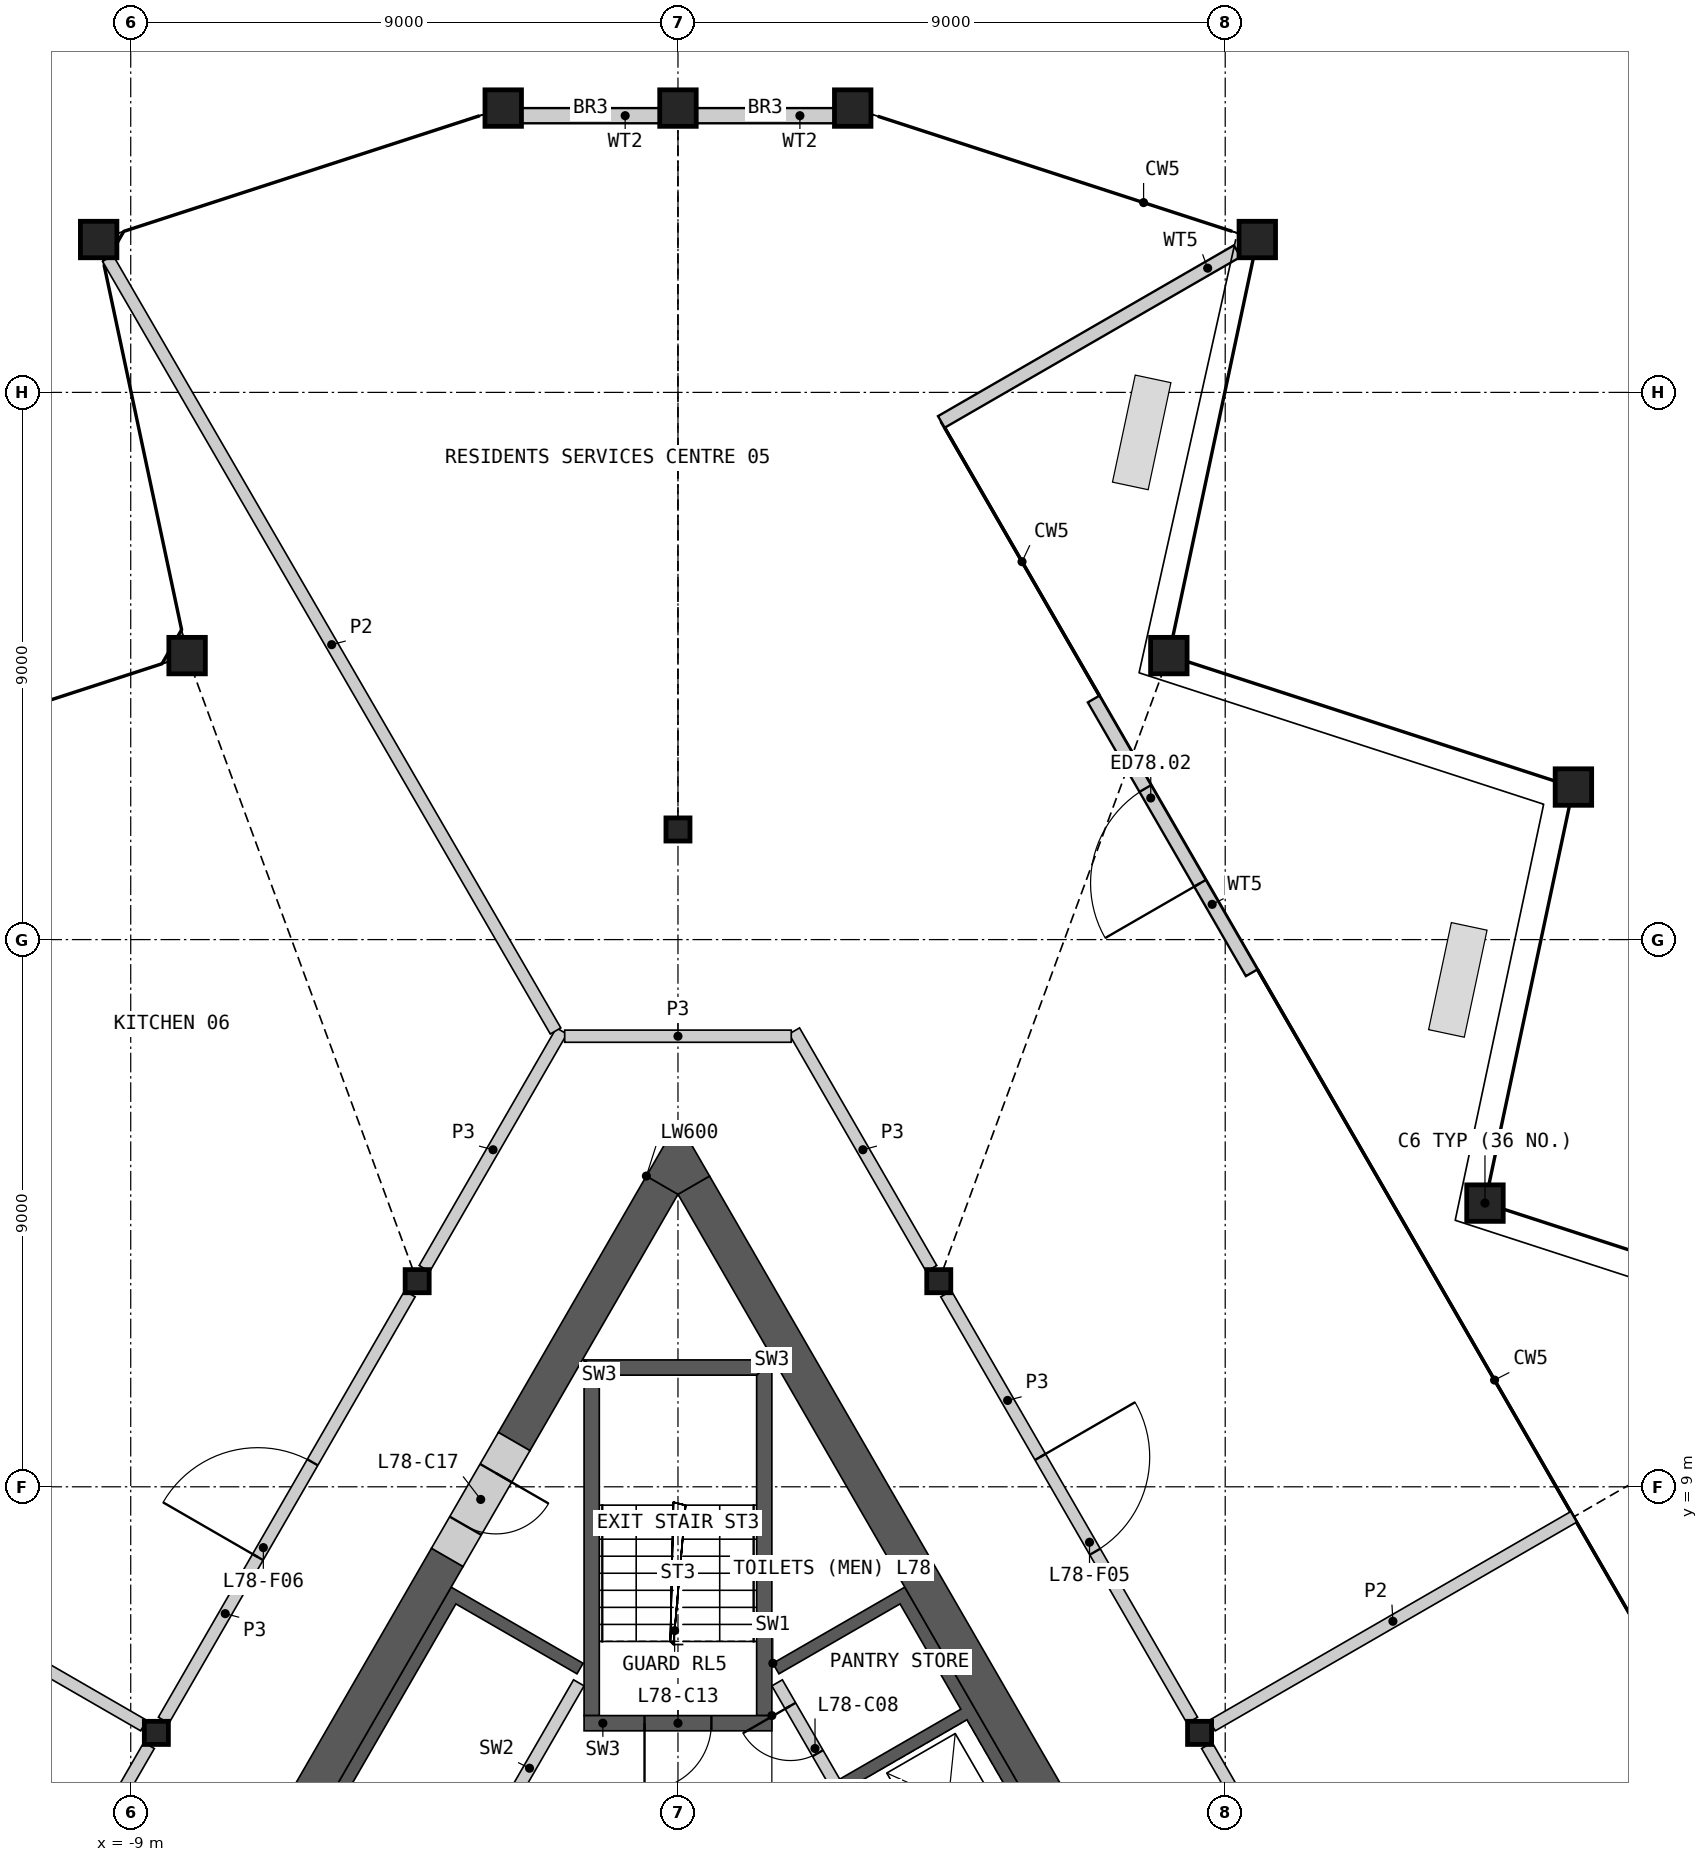
"""IFC4 building model, lengths in metres.
Left out: names, types, materials, properties, quantities, classifications, styles, units other than length and angle.
Written with IfcOpenShell. Run it as: python <this file> out.ifc"""

import sys

from ifc_helpers import new_model, si_unit, direction, frame, frame_2d, origin, origin_2d, place, context, subcontext, project, spatial, polyline, rectangle, hollow_rectangle, i_section, outline, extrude, element, fill, save


model = new_model("IFC4")
c1 = context("Model", 3, precision=1e-05, world=origin(), true_north=direction((0.0, 1.0)))
c2 = subcontext(c1, "Body", "Model", "MODEL_VIEW")
j1 = project(units=[si_unit("LENGTHUNIT", "METRE"), si_unit("PLANEANGLEUNIT", "RADIAN")], contexts=[c1])
p1 = place(None, origin())
s1 = spatial("IfcSite", under=j1, at=p1, CompositionType="ELEMENT")
p2 = place(p1, origin())
s2 = spatial("IfcBuilding", under=s1, at=p2, CompositionType="ELEMENT")
p3 = place(p2, frame((0.0, 0.0, 346.0)))
s3 = spatial("IfcBuildingStorey", under=s2, at=p3, CompositionType="ELEMENT", Elevation=346.0)
for number, where, z_axis, x_axis in (
    (1, (13.272, 13.666, 0.0), (0.0, 0.0, 1.0), (1.0, 0.0, 0.0)),
    (2, (14.727, 20.509, 0.0), (0.0, 0.0, 1.0), (1.0, 0.0, 0.0)),
    (3, (8.073, 22.671, 0.0), (0.0, 0.0, 1.0), (1.0, 0.0, 0.0)),
    (4, (9.527, 29.514, 0.0), (0.0, 0.0, 1.0), (1.0, 0.0, 0.0)),
    (5, (2.874, 31.676, 0.0), (0.0, 0.0, 1.0), (1.0, 0.0, 0.0)),
    (6, (0.0, 31.676, 0.0), (0.0, 0.0, 1.0), (1.0, 0.0, 0.0)),
    (7, (-2.874, 31.676, 0.0), (0.0, 0.0, 1.0), (1.0, 0.0, 0.0)),
    (8, (-9.527, 29.514, 0.0), (0.0, 0.0, 1.0), (1.0, 0.0, 0.0)),
    (9, (-8.073, 22.671, 0.0), (0.0, 0.0, 1.0), (1.0, 0.0, 0.0)),
):
    element("IfcColumn", number, at=place(p3, frame(where, z_axis=z_axis, x_axis=x_axis)), inside=s3, PredefinedType="COLUMN", context=c2, shape_type="SweptSolid", body=[
        extrude(hollow_rectangle(XDim=0.6, YDim=0.6, WallThickness=0.04, at=origin_2d()), origin(), (0.0, 0.0, 1.0), 10.0),
    ])
for number, where, z_axis, x_axis in (
    (10, (0.0, 19.811, 0.0), (0.0, 0.0, 1.0), (1.0, 0.0, 0.0)),
    (11, (-4.289, 12.382, 0.0), (0.0, 0.0, 1.0), (1.0, 0.0, 0.0)),
    (12, (-8.578, 4.953, 0.0), (0.0, 0.0, 1.0), (1.0, 0.0, 0.0)),
    (13, (8.578, 4.953, 0.0), (0.0, 0.0, 1.0), (1.0, 0.0, 0.0)),
    (14, (4.289, 12.382, 0.0), (0.0, 0.0, 1.0), (1.0, 0.0, 0.0)),
):
    element("IfcColumn", number, at=place(p3, frame(where, z_axis=z_axis, x_axis=x_axis)), inside=s3, PredefinedType="COLUMN", context=c2, shape_type="SweptSolid", body=[
        extrude(i_section(OverallWidth=0.396, OverallDepth=0.381, WebThickness=0.019, FlangeThickness=0.03, at=origin_2d()), origin(), (0.0, 0.0, 1.0), 10.0),
    ])
for number, where, z_axis, x_axis in (
    (15, (2.574, 31.551, 0.0), (0.0, 0.0, 1.0), (-1.0, 0.0, 0.0)),
    (16, (-0.3, 31.551, 0.0), (0.0, 0.0, 1.0), (-1.0, 0.0, 0.0)),
):
    element("IfcWall", number, at=place(p3, frame(where, z_axis=z_axis, x_axis=x_axis)), inside=s3, PredefinedType="SOLIDWALL", context=c2, shape_type="SweptSolid", body=[
        extrude(rectangle(XDim=2.274, YDim=0.25, at=frame_2d((1.137, 0.0))), origin(), (0.0, 0.0, 1.0), 9.088),
    ])
p4 = place(p3, frame((9.435, 17.454, 0.0), z_axis=(0.0, 0.0, 1.0), x_axis=(-0.500017832597, 0.866015107885, 0.0)))
e17 = element("IfcWall", 17, at=p4, inside=s3, PredefinedType="SOLIDWALL", context=c2, shape_type="SweptSolid", body=[
    extrude(rectangle(XDim=5.199, YDim=0.22, at=frame_2d((2.6, 0.0))), origin(), (0.0, 0.0, 1.0), 9.088),
])
p5 = place(p4, frame((1.699, 0.0, 0.0)))
e18 = element("IfcOpeningElement", 18, at=p5, cuts=e17, PredefinedType="OPENING", context=c2, shape_type="SweptSolid", body=[
    extrude(rectangle(XDim=1.8, YDim=2.4, at=frame_2d((0.9, 1.2))), frame((0.0, 0.12, 0.0), z_axis=(0.0, -1.0, 0.0), x_axis=(1.0, 0.0, 0.0)), (0.0, 0.0, 1.0), 0.24),
])
p6 = place(p3, frame((9.198, 29.324, 0.0), z_axis=(0.0, 0.0, 1.0), x_axis=(-0.866015577098, -0.500017019934, 0.0)))
e19 = element("IfcWall", 19, at=p6, inside=s3, PredefinedType="SOLIDWALL", context=c2, shape_type="SweptSolid", body=[
    extrude(rectangle(XDim=5.62, YDim=0.22, at=frame_2d((2.81, 0.0))), origin(), (0.0, 0.0, 1.0), 9.088),
])
p7 = place(p3, origin())
e20 = element("IfcWall", 20, at=p7, inside=s3, PredefinedType="SHEAR", context=c2, shape_type="SweptSolid", body=[
    extrude(outline(polyline([(1.561, 6.097), (3.731, 7.35), (8.231, -0.444), (6.061, -1.697), (5.96, -1.524), (7.952, -0.374), (6.952, 1.358), (4.96, 0.208), (4.861, 0.381), (6.852, 1.531), (5.852, 3.263), (3.861, 2.113), (3.76, 2.287), (5.752, 3.437), (4.752, 5.169), (2.76, 4.019), (2.66, 4.192), (4.652, 5.342), (3.652, 7.074), (1.66, 5.924), (1.561, 6.097)])), origin(), (0.0, 0.0, 1.0), 9.7),
])
p8 = place(p3, frame((5.817, -1.476, 0.0), z_axis=(0.0, 0.0, 1.0), x_axis=(-0.500002616675, 0.866023893041, 0.0)))
e21 = element("IfcWall", 21, at=p8, inside=s3, PredefinedType="SOLIDWALL", context=c2, shape_type="SweptSolid", body=[
    extrude(rectangle(XDim=8.373, YDim=0.2, at=frame_2d((4.187, 0.0))), origin(), (0.0, 0.0, 1.0), 9.7),
])
p9 = place(p8, frame((0.337, 0.0, 0.0)))
e22 = element("IfcOpeningElement", 22, at=p9, cuts=e21, PredefinedType="OPENING", context=c2, shape_type="SweptSolid", body=[
    extrude(rectangle(XDim=1.1, YDim=2.1, at=frame_2d((0.55, 1.05))), frame((0.0, 0.11, 0.0), z_axis=(0.0, -1.0, 0.0), x_axis=(1.0, 0.0, 0.0)), (0.0, 0.0, 1.0), 0.22),
])
p10 = place(p8, frame((2.537, 0.0, 0.0)))
e23 = element("IfcOpeningElement", 23, at=p10, cuts=e21, PredefinedType="OPENING", context=c2, shape_type="SweptSolid", body=[
    extrude(rectangle(XDim=1.1, YDim=2.1, at=frame_2d((0.55, 1.05))), frame((0.0, 0.11, 0.0), z_axis=(0.0, -1.0, 0.0), x_axis=(1.0, 0.0, 0.0)), (0.0, 0.0, 1.0), 0.22),
])
p11 = place(p8, frame((4.737, 0.0, 0.0)))
e24 = element("IfcOpeningElement", 24, at=p11, cuts=e21, PredefinedType="OPENING", context=c2, shape_type="SweptSolid", body=[
    extrude(rectangle(XDim=1.1, YDim=2.1, at=frame_2d((0.55, 1.05))), frame((0.0, 0.11, 0.0), z_axis=(0.0, -1.0, 0.0), x_axis=(1.0, 0.0, 0.0)), (0.0, 0.0, 1.0), 0.22),
])
p12 = place(p8, frame((7.037, 0.0, 0.0)))
e25 = element("IfcOpeningElement", 25, at=p12, cuts=e21, PredefinedType="OPENING", context=c2, shape_type="SweptSolid", body=[
    extrude(rectangle(XDim=0.9, YDim=2.1, at=frame_2d((0.45, 1.05))), frame((0.0, 0.11, 0.0), z_axis=(0.0, -1.0, 0.0), x_axis=(1.0, 0.0, 0.0)), (0.0, 0.0, 1.0), 0.22),
])
p13 = place(p3, origin())
e26 = element("IfcWall", 26, at=p13, inside=s3, PredefinedType="SHEAR", context=c2, shape_type="SweptSolid", body=[
    extrude(outline(polyline([(-4.96, 0.208), (-7.131, 1.461), (-3.731, 7.35), (-1.561, 6.097), (-1.66, 5.924), (-3.652, 7.074), (-6.852, 1.531), (-4.861, 0.381), (-4.96, 0.208)])), origin(), (0.0, 0.0, 1.0), 9.7),
])
p14 = place(p3, frame((-1.631, 5.776, 0.0), z_axis=(0.0, 0.0, 1.0), x_axis=(-0.499992876559, -0.866029516466, 0.0)))
e27 = element("IfcWall", 27, at=p14, inside=s3, PredefinedType="SOLIDWALL", context=c2, shape_type="SweptSolid", body=[
    extrude(rectangle(XDim=6.486, YDim=0.2, at=frame_2d((3.243, 0.0))), origin(), (0.0, 0.0, 1.0), 9.7),
])
p15 = place(p14, frame((2.637, 0.0, 0.0)))
e28 = element("IfcOpeningElement", 28, at=p15, cuts=e27, PredefinedType="OPENING", context=c2, shape_type="SweptSolid", body=[
    extrude(rectangle(XDim=0.9, YDim=2.1, at=frame_2d((0.45, 1.05))), frame((0.0, 0.11, 0.0), z_axis=(0.0, -1.0, 0.0), x_axis=(1.0, 0.0, 0.0)), (0.0, 0.0, 1.0), 0.22),
])
p16 = place(p3, origin())
e29 = element("IfcWall", 29, at=p16, inside=s3, PredefinedType="SHEAR", context=c2, shape_type="SweptSolid", body=[
    extrude(outline(polyline([(1.544, 5.237), (1.544, 11.087), (1.294, 10.837), (1.294, 5.237), (1.544, 5.237)])), origin(), (0.0, 0.0, 1.0), 9.7),
])
p17 = place(p3, origin())
e30 = element("IfcWall", 30, at=p17, inside=s3, PredefinedType="SHEAR", context=c2, shape_type="SweptSolid", body=[
    extrude(outline(polyline([(1.544, 11.087), (-1.544, 11.087), (-1.294, 10.837), (1.294, 10.837), (1.544, 11.087)])), origin(), (0.0, 0.0, 1.0), 9.7),
])
p18 = place(p3, origin())
e31 = element("IfcWall", 31, at=p18, inside=s3, PredefinedType="SHEAR", context=c2, shape_type="SweptSolid", body=[
    extrude(outline(polyline([(-1.294, 10.837), (-1.544, 11.087), (-1.544, 5.237), (-1.294, 5.237), (-1.294, 10.837)])), origin(), (0.0, 0.0, 1.0), 9.7),
])
p19 = place(p3, frame((1.544, 5.112, 0.0), z_axis=(0.0, 0.0, 1.0), x_axis=(-1.0, 0.0, 0.0)))
e32 = element("IfcWall", 32, at=p19, inside=s3, PredefinedType="SHEAR", context=c2, shape_type="SweptSolid", body=[
    extrude(rectangle(XDim=3.088, YDim=0.25, at=frame_2d((1.544, 0.0))), origin(), (0.0, 0.0, 1.0), 9.7),
])
p20 = place(p19, frame((0.994, 0.0, 0.0)))
e33 = element("IfcOpeningElement", 33, at=p20, cuts=e32, PredefinedType="OPENING", context=c2, shape_type="SweptSolid", body=[
    extrude(rectangle(XDim=1.1, YDim=2.1, at=frame_2d((0.55, 1.05))), frame((0.0, 0.135, 0.0), z_axis=(0.0, -1.0, 0.0), x_axis=(1.0, 0.0, 0.0)), (0.0, 0.0, 1.0), 0.27),
])
p21 = place(p3, frame((8.686, -0.634, 0.0), z_axis=(0.0, 0.0, 1.0), x_axis=(-0.500004601921, 0.866022746848, 0.0)))
e34 = element("IfcWall", 34, at=p21, inside=s3, PredefinedType="SHEAR", context=c2, shape_type="SweptSolid", body=[
    extrude(rectangle(XDim=16.853, YDim=0.6, at=frame_2d((8.426, 0.0))), origin(), (0.0, 0.0, 1.0), 9.7),
])
p22 = place(p3, frame((-3.794, 7.84, 0.0), z_axis=(0.0, 0.0, 1.0), x_axis=(-0.499974747889, -0.866039982607, 0.0)))
e35 = element("IfcWall", 35, at=p22, inside=s3, PredefinedType="SHEAR", context=c2, shape_type="SweptSolid", body=[
    extrude(rectangle(XDim=7.092, YDim=0.6, at=frame_2d((3.546, 0.0))), origin(), (0.0, 0.0, 1.0), 9.7),
])
p23 = place(p3, frame((-0.26, 13.961, 0.0), z_axis=(0.0, 0.0, 1.0), x_axis=(-0.50000604952, -0.866021911064, 0.0)))
e36 = element("IfcWall", 36, at=p23, inside=s3, PredefinedType="SHEAR", context=c2, shape_type="SweptSolid", body=[
    extrude(rectangle(XDim=4.869, YDim=0.6, at=frame_2d((2.434, 0.0))), origin(), (0.0, 0.0, 1.0), 9.7),
])
p24 = place(p3, origin())
e37 = element("IfcWall", 37, at=p24, inside=s3, PredefinedType="SHEAR", context=c2, shape_type="SweptSolid", body=[
    extrude(outline(polyline([(-0.52, 14.111), (0.0, 15.011), (0.52, 14.111), (0.0, 13.811), (-0.52, 14.111)])), origin(), (0.0, 0.0, 1.0), 9.7),
])
p25 = place(p3, frame((-2.694, 9.745, 0.0), z_axis=(0.0, 0.0, 1.0), x_axis=(-0.50002983664, -0.866008176907, 0.0)))
e38 = element("IfcWall", 38, at=p25, inside=s3, PredefinedType="SHEAR", context=c2, shape_type="SweptSolid", body=[
    extrude(rectangle(XDim=2.2, YDim=0.6, at=frame_2d((1.1, 0.0))), origin(), (0.0, 0.0, 1.0), 9.7),
])
p26 = place(p25, frame((0.6, 0.0, 0.0)))
e39 = element("IfcOpeningElement", 39, at=p26, cuts=e38, PredefinedType="OPENING", context=c2, shape_type="SweptSolid", body=[
    extrude(rectangle(XDim=1.0, YDim=2.1, at=frame_2d((0.5, 1.05))), frame((0.0, 0.31, 0.0), z_axis=(0.0, -1.0, 0.0), x_axis=(1.0, 0.0, 0.0)), (0.0, 0.0, 1.0), 0.62),
])
p27 = place(p3, frame((4.409, 12.174, 0.0), z_axis=(0.0, 0.0, 1.0), x_axis=(0.499984266882, -0.866034487114, 0.0)))
e40 = element("IfcWall", 40, at=p27, inside=s3, PredefinedType="PARTITIONING", context=c2, shape_type="SweptSolid", body=[
    extrude(rectangle(XDim=8.099, YDim=0.2, at=frame_2d((4.049, 0.0))), origin(), (0.0, 0.0, 1.0), 9.7),
])
p28 = place(p27, frame((3.099, 0.0, 0.0)))
e41 = element("IfcOpeningElement", 41, at=p28, cuts=e40, PredefinedType="OPENING", context=c2, shape_type="SweptSolid", body=[
    extrude(rectangle(XDim=1.8, YDim=2.1, at=frame_2d((0.9, 1.05))), frame((0.0, 0.11, 0.0), z_axis=(0.0, -1.0, 0.0), x_axis=(1.0, 0.0, 0.0)), (0.0, 0.0, 1.0), 0.22),
])
p29 = place(p3, frame((-8.458, 5.16, 0.0), z_axis=(0.0, 0.0, 1.0), x_axis=(0.499984266882, 0.866034487114, 0.0)))
e42 = element("IfcWall", 42, at=p29, inside=s3, PredefinedType="PARTITIONING", context=c2, shape_type="SweptSolid", body=[
    extrude(rectangle(XDim=8.099, YDim=0.2, at=frame_2d((4.049, 0.0))), origin(), (0.0, 0.0, 1.0), 9.7),
])
p30 = place(p29, frame((3.099, 0.0, 0.0)))
e43 = element("IfcOpeningElement", 43, at=p30, cuts=e42, PredefinedType="OPENING", context=c2, shape_type="SweptSolid", body=[
    extrude(rectangle(XDim=1.8, YDim=2.1, at=frame_2d((0.9, 1.05))), frame((0.0, 0.11, 0.0), z_axis=(0.0, -1.0, 0.0), x_axis=(1.0, 0.0, 0.0)), (0.0, 0.0, 1.0), 0.22),
])
p31 = place(p3, frame((8.698, 4.745, 0.0), z_axis=(0.0, 0.0, 1.0), x_axis=(0.499984266882, -0.866034487114, 0.0)))
e44 = element("IfcWall", 44, at=p31, inside=s3, PredefinedType="PARTITIONING", context=c2, shape_type="SweptSolid", body=[
    extrude(rectangle(XDim=8.099, YDim=0.2, at=frame_2d((4.049, 0.0))), origin(), (0.0, 0.0, 1.0), 9.7),
])
p32 = place(p31, frame((3.099, 0.0, 0.0)))
e45 = element("IfcOpeningElement", 45, at=p32, cuts=e44, PredefinedType="OPENING", context=c2, shape_type="SweptSolid", body=[
    extrude(rectangle(XDim=1.8, YDim=2.1, at=frame_2d((0.9, 1.05))), frame((0.0, 0.11, 0.0), z_axis=(0.0, -1.0, 0.0), x_axis=(1.0, 0.0, 0.0)), (0.0, 0.0, 1.0), 0.22),
])
p33 = place(p3, frame((-12.748, -2.269, 0.0), z_axis=(0.0, 0.0, 1.0), x_axis=(0.499984266882, 0.866034487114, 0.0)))
e46 = element("IfcWall", 46, at=p33, inside=s3, PredefinedType="PARTITIONING", context=c2, shape_type="SweptSolid", body=[
    extrude(rectangle(XDim=8.099, YDim=0.2, at=frame_2d((4.049, 0.0))), origin(), (0.0, 0.0, 1.0), 9.7),
])
p34 = place(p33, frame((3.2, 0.0, 0.0)))
e47 = element("IfcOpeningElement", 47, at=p34, cuts=e46, PredefinedType="OPENING", context=c2, shape_type="SweptSolid", body=[
    extrude(rectangle(XDim=1.8, YDim=2.1, at=frame_2d((0.9, 1.05))), frame((0.0, 0.11, 0.0), z_axis=(0.0, -1.0, 0.0), x_axis=(1.0, 0.0, 0.0)), (0.0, 0.0, 1.0), 0.22),
])
for number, where, z_axis, x_axis in (
    (48, (-4.169, 12.59, 0.0), (0.0, 0.0, 1.0), (0.5, 0.866, 0.0)),
    (49, (1.913, 16.498, 0.0), (0.0, 0.0, 1.0), (0.5, -0.866, 0.0)),
):
    element("IfcWall", number, at=place(p3, frame(where, z_axis=z_axis, x_axis=x_axis)), inside=s3, PredefinedType="PARTITIONING", context=c2, shape_type="SweptSolid", body=[
        extrude(rectangle(XDim=4.513, YDim=0.2, at=frame_2d((2.256, 0.0))), origin(), (0.0, 0.0, 1.0), 9.7),
    ])
p35 = place(p3, frame((-1.863, 16.411, 0.0), z_axis=(0.0, 0.0, 1.0), x_axis=(1.0, 0.0, 0.0)))
e50 = element("IfcWall", 50, at=p35, inside=s3, PredefinedType="PARTITIONING", context=c2, shape_type="SweptSolid", body=[
    extrude(rectangle(XDim=3.726, YDim=0.2, at=frame_2d((1.863, 0.0))), origin(), (0.0, 0.0, 1.0), 9.7),
])
p36 = place(p3, frame((-9.377, 29.204, 0.0), z_axis=(0.0, 0.0, 1.0), x_axis=(0.501398610674, -0.865216408313, 0.0)))
e51 = element("IfcWall", 51, at=p36, inside=s3, PredefinedType="PARTITIONING", context=c2, shape_type="SweptSolid", body=[
    extrude(rectangle(XDim=14.686, YDim=0.2, at=frame_2d((7.343, 0.0))), origin(), (0.0, 0.0, 1.0), 8.93),
])
p37 = place(p3, frame((-19.615, 11.325, 0.0), z_axis=(0.0, 0.0, 1.0), x_axis=(0.86602139559, -0.500006942333, 0.0)))
e52 = element("IfcWall", 52, at=p37, inside=s3, PredefinedType="PARTITIONING", context=c2, shape_type="SweptSolid", body=[
    extrude(rectangle(XDim=12.505, YDim=0.2, at=frame_2d((6.252, 0.0))), origin(), (0.0, 0.0, 1.0), 8.93),
])
p38 = place(p3, frame((8.786, 5.073, 0.0), z_axis=(0.0, 0.0, 1.0), x_axis=(0.866041038191, 0.499972919436, 0.0)))
e53 = element("IfcWall", 53, at=p38, inside=s3, PredefinedType="PARTITIONING", context=c2, shape_type="SweptSolid", body=[
    extrude(rectangle(XDim=6.863, YDim=0.2, at=frame_2d((3.431, 0.0))), origin(), (0.0, 0.0, 1.0), 8.93),
])
p39 = place(p5, origin())
e54 = element("IfcDoor", 54, at=p39, inside=s3, OperationType="DOUBLE_DOOR_SINGLE_SWING", PredefinedType="DOOR", context=c2, shape_type="SweptSolid", body=[
    extrude(rectangle(XDim=1.8, YDim=2.4, at=frame_2d((0.9, 1.2))), frame((0.0, 0.025, 0.0), z_axis=(0.0, -1.0, 0.0), x_axis=(1.0, 0.0, 0.0)), (0.0, 0.0, 1.0), 0.05),
])
fill(e18, e54)
p40 = place(p12, origin())
e55 = element("IfcDoor", 55, at=p40, inside=s3, OperationType="SINGLE_SWING_RIGHT", PredefinedType="DOOR", context=c2, shape_type="SweptSolid", body=[
    extrude(rectangle(XDim=0.9, YDim=2.1, at=frame_2d((0.45, 1.05))), frame((0.0, 0.025, 0.0), z_axis=(0.0, -1.0, 0.0), x_axis=(1.0, 0.0, 0.0)), (0.0, 0.0, 1.0), 0.05),
])
fill(e25, e55)
p41 = place(p20, origin())
e56 = element("IfcDoor", 56, at=p41, inside=s3, OperationType="SINGLE_SWING_RIGHT", PredefinedType="DOOR", context=c2, shape_type="SweptSolid", body=[
    extrude(rectangle(XDim=1.1, YDim=2.1, at=frame_2d((0.55, 1.05))), frame((0.0, 0.025, 0.0), z_axis=(0.0, -1.0, 0.0), x_axis=(1.0, 0.0, 0.0)), (0.0, 0.0, 1.0), 0.05),
])
fill(e33, e56)
p42 = place(p26, origin())
e57 = element("IfcDoor", 57, at=p42, inside=s3, OperationType="SINGLE_SWING_LEFT", PredefinedType="DOOR", context=c2, shape_type="SweptSolid", body=[
    extrude(rectangle(XDim=1.0, YDim=2.1, at=frame_2d((0.5, 1.05))), frame((0.0, 0.055, 0.0), z_axis=(0.0, -1.0, 0.0), x_axis=(1.0, 0.0, 0.0)), (0.0, 0.0, 1.0), 0.05),
])
fill(e39, e57)
p43 = place(p28, origin())
e58 = element("IfcDoor", 58, at=p43, inside=s3, OperationType="DOUBLE_DOOR_SINGLE_SWING", PredefinedType="DOOR", context=c2, shape_type="SweptSolid", body=[
    extrude(rectangle(XDim=1.8, YDim=2.1, at=frame_2d((0.9, 1.05))), frame((0.0, 0.025, 0.0), z_axis=(0.0, -1.0, 0.0), x_axis=(1.0, 0.0, 0.0)), (0.0, 0.0, 1.0), 0.05),
])
fill(e41, e58)
p44 = place(p30, origin())
e59 = element("IfcDoor", 59, at=p44, inside=s3, OperationType="DOUBLE_DOOR_SINGLE_SWING", PredefinedType="DOOR", context=c2, shape_type="SweptSolid", body=[
    extrude(rectangle(XDim=1.8, YDim=2.1, at=frame_2d((0.9, 1.05))), frame((0.0, 0.025, 0.0), z_axis=(0.0, -1.0, 0.0), x_axis=(1.0, 0.0, 0.0)), (0.0, 0.0, 1.0), 0.05),
])
fill(e43, e59)
save(model, sys.argv[1])
